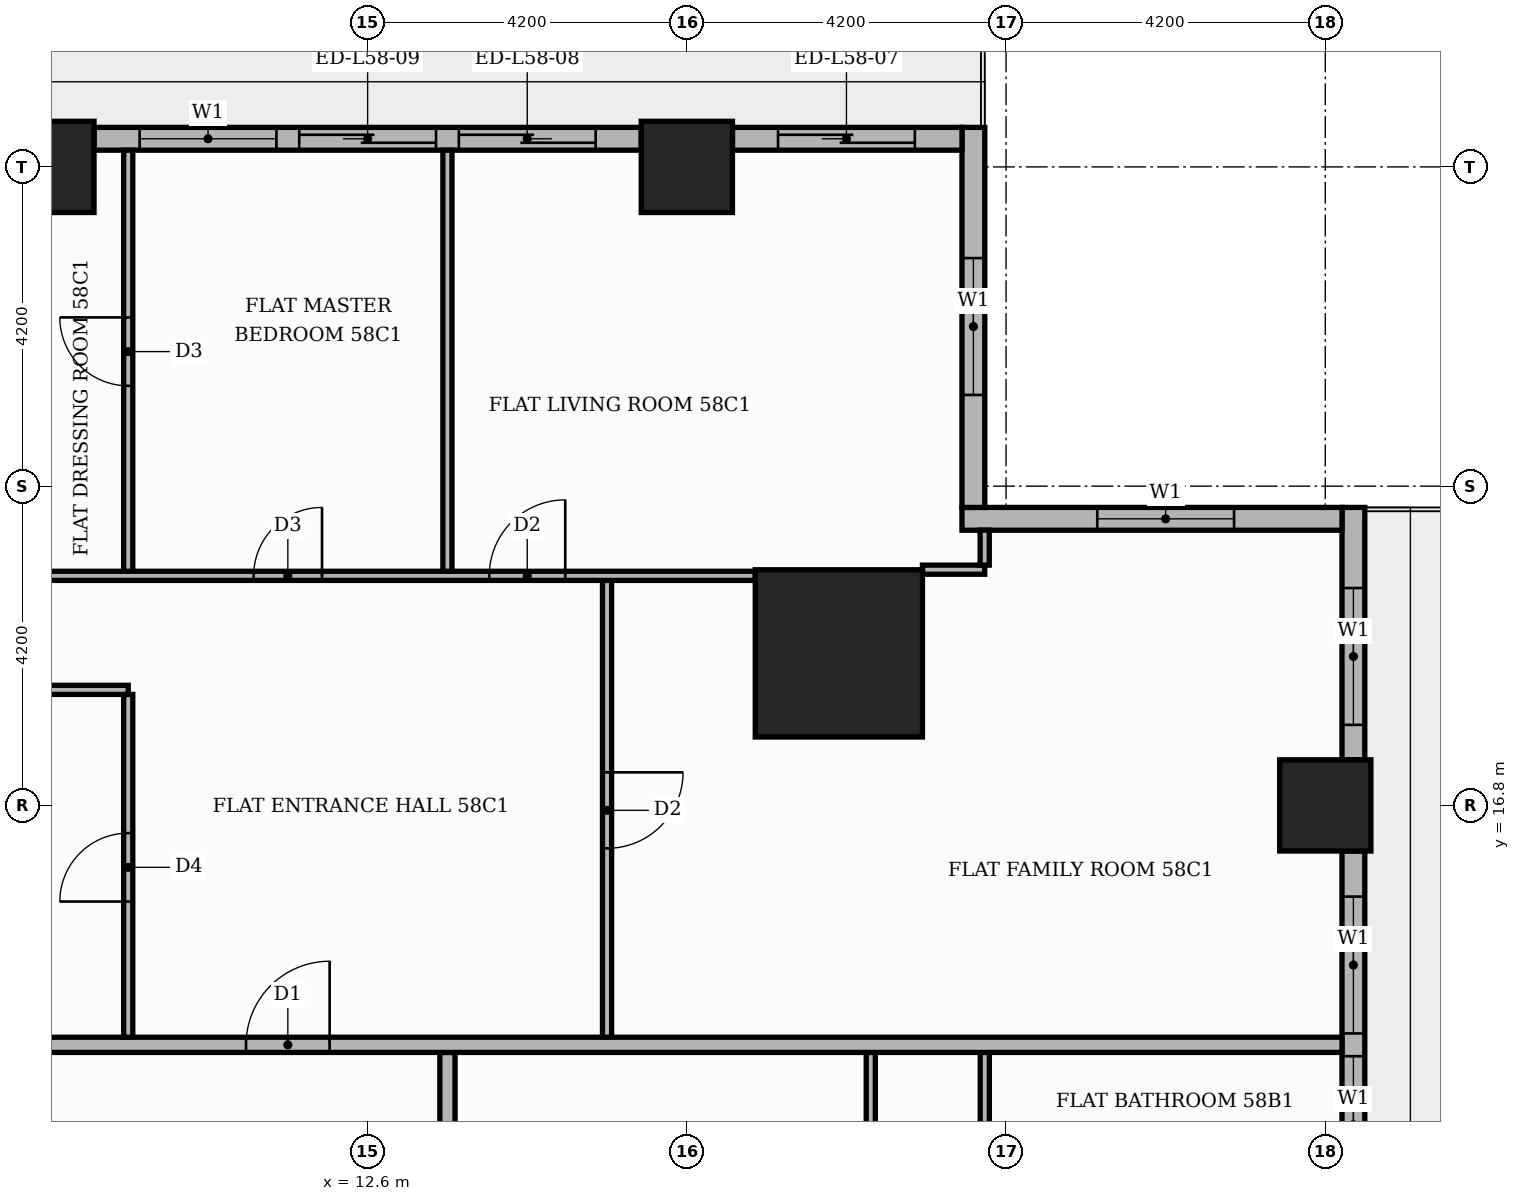
"""IFC4 building model, lengths in metres.
Left out: names, types, materials, properties, quantities, classifications, styles, units other than length and angle.
Written with IfcOpenShell. Run it as: python <this file> out.ifc"""

import sys

from ifc_helpers import new_model, si_unit, direction, frame, frame_2d, origin, origin_2d, place, context, subcontext, project, spatial, rectangle, extrude, element, fill, save


model = new_model("IFC4")
c1 = context("Model", 3, precision=1e-05, world=origin(), true_north=direction((0.0, 1.0)))
c2 = subcontext(c1, "Body", "Model", "MODEL_VIEW")
j1 = project(units=[si_unit("LENGTHUNIT", "METRE"), si_unit("PLANEANGLEUNIT", "RADIAN")], contexts=[c1])
p1 = place(None, origin())
s1 = spatial("IfcSite", under=j1, at=p1, CompositionType="ELEMENT")
p2 = place(p1, origin())
s2 = spatial("IfcBuilding", under=s1, at=p2, CompositionType="ELEMENT")
p3 = place(p2, frame((0.0, 0.0, 244.5)))
s3 = spatial("IfcBuildingStorey", under=s2, at=p3, CompositionType="ELEMENT", Elevation=244.5)
p4 = place(p3, frame((18.8, 18.8, 0.0), z_axis=(0.0, 0.0, 1.0), x_axis=(1.0, 0.0, 0.0)))
e1 = element("IfcColumn", 1, at=p4, inside=s3, PredefinedType="COLUMN", context=c2, shape_type="SweptSolid", body=[
    extrude(rectangle(XDim=2.2, YDim=2.2, at=origin_2d()), origin(), (0.0, 0.0, 1.0), 3.9),
])
for number, where, z_axis, x_axis in (
    (2, (25.2, 16.8, 0.0), (0.0, 0.0, 1.0), (1.0, 0.0, 0.0)),
    (3, (8.4, 25.2, 0.0), (0.0, 0.0, 1.0), (1.0, 0.0, 0.0)),
    (4, (16.8, 25.2, 0.0), (0.0, 0.0, 1.0), (1.0, 0.0, 0.0)),
):
    element("IfcColumn", number, at=place(p3, frame(where, z_axis=z_axis, x_axis=x_axis)), inside=s3, PredefinedType="COLUMN", context=c2, shape_type="SweptSolid", body=[
        extrude(rectangle(XDim=1.2, YDim=1.2, at=origin_2d()), origin(), (0.0, 0.0, 1.0), 3.9),
    ])
p5 = place(p3, frame((25.57, 9.0, 0.0), z_axis=(0.0, 0.0, 1.0), x_axis=(0.0, 1.0, 0.0)))
e5 = element("IfcWall", 5, at=p5, inside=s3, PredefinedType="STANDARD", context=c2, shape_type="SweptSolid", body=[
    extrude(rectangle(XDim=7.2, YDim=0.3, at=frame_2d((3.6, 0.0))), origin(), (0.0, 0.0, 1.0), 3.48),
])
p6 = place(p5, frame((0.6, 0.0, 0.9)))
e6 = element("IfcOpeningElement", 6, at=p6, cuts=e5, PredefinedType="OPENING", context=c2, shape_type="SweptSolid", body=[
    extrude(rectangle(XDim=1.8, YDim=2.1, at=frame_2d((0.9, 1.05))), frame((0.0, 0.16, 0.0), z_axis=(0.0, -1.0, 0.0), x_axis=(1.0, 0.0, 0.0)), (0.0, 0.0, 1.0), 0.32),
])
p7 = place(p5, frame((2.7, 0.0, 0.9)))
e7 = element("IfcOpeningElement", 7, at=p7, cuts=e5, PredefinedType="OPENING", context=c2, shape_type="SweptSolid", body=[
    extrude(rectangle(XDim=1.8, YDim=2.1, at=frame_2d((0.9, 1.05))), frame((0.0, 0.16, 0.0), z_axis=(0.0, -1.0, 0.0), x_axis=(1.0, 0.0, 0.0)), (0.0, 0.0, 1.0), 0.32),
])
p8 = place(p5, frame((4.8, 0.0, 0.9)))
e8 = element("IfcOpeningElement", 8, at=p8, cuts=e5, PredefinedType="OPENING", context=c2, shape_type="SweptSolid", body=[
    extrude(rectangle(XDim=1.8, YDim=2.1, at=frame_2d((0.9, 1.05))), frame((0.0, 0.16, 0.0), z_axis=(0.0, -1.0, 0.0), x_axis=(1.0, 0.0, 0.0)), (0.0, 0.0, 1.0), 0.32),
])
p9 = place(p3, frame((25.57, 17.4, 0.0), z_axis=(0.0, 0.0, 1.0), x_axis=(0.0, 1.0, 0.0)))
e9 = element("IfcWall", 9, at=p9, inside=s3, PredefinedType="STANDARD", context=c2, shape_type="SweptSolid", body=[
    extrude(rectangle(XDim=3.32, YDim=0.3, at=frame_2d((1.66, 0.0))), origin(), (0.0, 0.0, 1.0), 3.48),
])
p10 = place(p9, frame((0.459, 0.0, 0.9)))
e10 = element("IfcOpeningElement", 10, at=p10, cuts=e9, PredefinedType="OPENING", context=c2, shape_type="SweptSolid", body=[
    extrude(rectangle(XDim=1.8, YDim=2.1, at=frame_2d((0.9, 1.05))), frame((0.0, 0.16, 0.0), z_axis=(0.0, -1.0, 0.0), x_axis=(1.0, 0.0, 0.0)), (0.0, 0.0, 1.0), 0.32),
])
p11 = place(p3, frame((25.42, 20.57, 0.0), z_axis=(0.0, 0.0, 1.0), x_axis=(-1.0, 0.0, 0.0)))
e11 = element("IfcWall", 11, at=p11, inside=s3, PredefinedType="STANDARD", context=c2, shape_type="SweptSolid", body=[
    extrude(rectangle(XDim=5.0, YDim=0.3, at=frame_2d((2.5, 0.0))), origin(), (0.0, 0.0, 1.0), 3.48),
])
p12 = place(p11, frame((1.42, 0.0, 0.9)))
e12 = element("IfcOpeningElement", 12, at=p12, cuts=e11, PredefinedType="OPENING", context=c2, shape_type="SweptSolid", body=[
    extrude(rectangle(XDim=1.8, YDim=2.1, at=frame_2d((0.9, 1.05))), frame((0.0, 0.16, 0.0), z_axis=(0.0, -1.0, 0.0), x_axis=(1.0, 0.0, 0.0)), (0.0, 0.0, 1.0), 0.32),
])
p13 = place(p3, frame((20.57, 20.72, 0.0), z_axis=(0.0, 0.0, 1.0), x_axis=(0.0, 1.0, 0.0)))
e13 = element("IfcWall", 13, at=p13, inside=s3, PredefinedType="STANDARD", context=c2, shape_type="SweptSolid", body=[
    extrude(rectangle(XDim=5.0, YDim=0.3, at=frame_2d((2.5, 0.0))), origin(), (0.0, 0.0, 1.0), 3.48),
])
p14 = place(p13, frame((1.48, 0.0, 0.9)))
e14 = element("IfcOpeningElement", 14, at=p14, cuts=e13, PredefinedType="OPENING", context=c2, shape_type="SweptSolid", body=[
    extrude(rectangle(XDim=1.8, YDim=2.1, at=frame_2d((0.9, 1.05))), frame((0.0, 0.16, 0.0), z_axis=(0.0, -1.0, 0.0), x_axis=(1.0, 0.0, 0.0)), (0.0, 0.0, 1.0), 0.32),
])
p15 = place(p3, frame((20.42, 25.57, 0.0), z_axis=(0.0, 0.0, 1.0), x_axis=(-1.0, 0.0, 0.0)))
e15 = element("IfcWall", 15, at=p15, inside=s3, PredefinedType="STANDARD", context=c2, shape_type="SweptSolid", body=[
    extrude(rectangle(XDim=3.02, YDim=0.3, at=frame_2d((1.51, 0.0))), origin(), (0.0, 0.0, 1.0), 3.48),
])
p16 = place(p15, frame((0.62, 0.0, 0.0)))
e16 = element("IfcOpeningElement", 16, at=p16, cuts=e15, PredefinedType="OPENING", context=c2, shape_type="SweptSolid", body=[
    extrude(rectangle(XDim=1.8, YDim=2.4, at=frame_2d((0.9, 1.2))), frame((0.0, 0.16, 0.0), z_axis=(0.0, -1.0, 0.0), x_axis=(1.0, 0.0, 0.0)), (0.0, 0.0, 1.0), 0.32),
])
p17 = place(p3, frame((16.2, 25.57, 0.0), z_axis=(0.0, 0.0, 1.0), x_axis=(-1.0, 0.0, 0.0)))
e17 = element("IfcWall", 17, at=p17, inside=s3, PredefinedType="STANDARD", context=c2, shape_type="SweptSolid", body=[
    extrude(rectangle(XDim=7.2, YDim=0.3, at=frame_2d((3.6, 0.0))), origin(), (0.0, 0.0, 1.0), 3.48),
])
p18 = place(p17, frame((0.6, 0.0, 0.0)))
e18 = element("IfcOpeningElement", 18, at=p18, cuts=e17, PredefinedType="OPENING", context=c2, shape_type="SweptSolid", body=[
    extrude(rectangle(XDim=1.8, YDim=2.4, at=frame_2d((0.9, 1.2))), frame((0.0, 0.16, 0.0), z_axis=(0.0, -1.0, 0.0), x_axis=(1.0, 0.0, 0.0)), (0.0, 0.0, 1.0), 0.32),
])
p19 = place(p17, frame((2.7, 0.0, 0.0)))
e19 = element("IfcOpeningElement", 19, at=p19, cuts=e17, PredefinedType="OPENING", context=c2, shape_type="SweptSolid", body=[
    extrude(rectangle(XDim=1.8, YDim=2.4, at=frame_2d((0.9, 1.2))), frame((0.0, 0.16, 0.0), z_axis=(0.0, -1.0, 0.0), x_axis=(1.0, 0.0, 0.0)), (0.0, 0.0, 1.0), 0.32),
])
p20 = place(p17, frame((4.8, 0.0, 0.9)))
e20 = element("IfcOpeningElement", 20, at=p20, cuts=e17, PredefinedType="OPENING", context=c2, shape_type="SweptSolid", body=[
    extrude(rectangle(XDim=1.8, YDim=2.1, at=frame_2d((0.9, 1.05))), frame((0.0, 0.16, 0.0), z_axis=(0.0, -1.0, 0.0), x_axis=(1.0, 0.0, 0.0)), (0.0, 0.0, 1.0), 0.32),
])
p21 = place(p3, frame((19.22, 9.36, 0.0), z_axis=(0.0, 0.0, 1.0), x_axis=(0.0, 1.0, 0.0)))
e21 = element("IfcWall", 21, at=p21, inside=s3, PredefinedType="PARTITIONING", context=c2, shape_type="SweptSolid", body=[
    extrude(rectangle(XDim=4.19, YDim=0.12, at=frame_2d((2.095, 0.0))), origin(), (0.0, 0.0, 1.0), 3.48),
])
p22 = place(p21, frame((1.665, 0.0, 0.0)))
e22 = element("IfcOpeningElement", 22, at=p22, cuts=e21, PredefinedType="OPENING", context=c2, shape_type="SweptSolid", body=[
    extrude(rectangle(XDim=0.9, YDim=2.1, at=frame_2d((0.45, 1.05))), frame((0.0, 0.07, 0.0), z_axis=(0.0, -1.0, 0.0), x_axis=(1.0, 0.0, 0.0)), (0.0, 0.0, 1.0), 0.14),
])
p23 = place(p3, frame((13.65, 11.1, 0.0), z_axis=(0.0, 0.0, 1.0), x_axis=(0.0, 1.0, 0.0)))
e23 = element("IfcWall", 23, at=p23, inside=s3, PredefinedType="PARTITIONING", context=c2, shape_type="SweptSolid", body=[
    extrude(rectangle(XDim=2.45, YDim=0.2, at=frame_2d((1.225, 0.0))), origin(), (0.0, 0.0, 1.0), 3.48),
])
p24 = place(p3, frame((20.72, 11.61, 0.0), z_axis=(0.0, 0.0, 1.0), x_axis=(0.0, 1.0, 0.0)))
e24 = element("IfcWall", 24, at=p24, inside=s3, PredefinedType="PARTITIONING", context=c2, shape_type="SweptSolid", body=[
    extrude(rectangle(XDim=1.94, YDim=0.12, at=frame_2d((0.97, 0.0))), origin(), (0.0, 0.0, 1.0), 3.48),
])
p25 = place(p3, frame((-13.65, 13.65, 0.0), z_axis=(0.0, 0.0, 1.0), x_axis=(1.0, 0.0, 0.0)))
e25 = element("IfcWall", 25, at=p25, inside=s3, PredefinedType="PARTITIONING", context=c2, shape_type="SweptSolid", body=[
    extrude(rectangle(XDim=39.07, YDim=0.2, at=frame_2d((19.535, 0.0))), origin(), (0.0, 0.0, 1.0), 3.48),
])
p26 = place(p25, frame((24.65, 0.0, 0.0)))
e26 = element("IfcOpeningElement", 26, at=p26, cuts=e25, PredefinedType="OPENING", context=c2, shape_type="SweptSolid", body=[
    extrude(rectangle(XDim=1.1, YDim=2.4, at=frame_2d((0.55, 1.2))), frame((0.0, 0.11, 0.0), z_axis=(0.0, -1.0, 0.0), x_axis=(1.0, 0.0, 0.0)), (0.0, 0.0, 1.0), 0.22),
])
p27 = place(p25, frame((12.05, 0.0, 0.0)))
e27 = element("IfcOpeningElement", 27, at=p27, cuts=e25, PredefinedType="OPENING", context=c2, shape_type="SweptSolid", body=[
    extrude(rectangle(XDim=1.1, YDim=2.4, at=frame_2d((0.55, 1.2))), frame((0.0, 0.11, 0.0), z_axis=(0.0, -1.0, 0.0), x_axis=(1.0, 0.0, 0.0)), (0.0, 0.0, 1.0), 0.22),
])
p28 = place(p3, frame((9.45, 13.75, 0.0), z_axis=(0.0, 0.0, 1.0), x_axis=(0.0, 1.0, 0.0)))
e28 = element("IfcWall", 28, at=p28, inside=s3, PredefinedType="PARTITIONING", context=c2, shape_type="SweptSolid", body=[
    extrude(rectangle(XDim=4.51, YDim=0.12, at=frame_2d((2.255, 0.0))), origin(), (0.0, 0.0, 1.0), 3.48),
])
p29 = place(p28, frame((1.785, 0.0, 0.0)))
e29 = element("IfcOpeningElement", 29, at=p29, cuts=e28, PredefinedType="OPENING", context=c2, shape_type="SweptSolid", body=[
    extrude(rectangle(XDim=0.9, YDim=2.1, at=frame_2d((0.45, 1.05))), frame((0.0, 0.07, 0.0), z_axis=(0.0, -1.0, 0.0), x_axis=(1.0, 0.0, 0.0)), (0.0, 0.0, 1.0), 0.14),
])
p30 = place(p3, frame((15.75, 13.75, 0.0), z_axis=(0.0, 0.0, 1.0), x_axis=(0.0, 1.0, 0.0)))
e30 = element("IfcWall", 30, at=p30, inside=s3, PredefinedType="PARTITIONING", context=c2, shape_type="SweptSolid", body=[
    extrude(rectangle(XDim=6.01, YDim=0.12, at=frame_2d((3.005, 0.0))), origin(), (0.0, 0.0, 1.0), 3.48),
])
p31 = place(p30, frame((2.485, 0.0, 0.0)))
e31 = element("IfcOpeningElement", 31, at=p31, cuts=e30, PredefinedType="OPENING", context=c2, shape_type="SweptSolid", body=[
    extrude(rectangle(XDim=1.0, YDim=2.1, at=frame_2d((0.5, 1.05))), frame((0.0, 0.07, 0.0), z_axis=(0.0, -1.0, 0.0), x_axis=(1.0, 0.0, 0.0)), (0.0, 0.0, 1.0), 0.14),
])
p32 = place(p3, frame((5.35, 18.32, 0.0), z_axis=(0.0, 0.0, 1.0), x_axis=(1.0, 0.0, 0.0)))
e32 = element("IfcWall", 32, at=p32, inside=s3, PredefinedType="PARTITIONING", context=c2, shape_type="SweptSolid", body=[
    extrude(rectangle(XDim=4.1, YDim=0.12, at=frame_2d((2.05, 0.0))), origin(), (0.0, 0.0, 1.0), 3.48),
])
p33 = place(p32, frame((0.5, 0.0, 0.0)))
e33 = element("IfcOpeningElement", 33, at=p33, cuts=e32, PredefinedType="OPENING", context=c2, shape_type="SweptSolid", body=[
    extrude(rectangle(XDim=0.9, YDim=2.1, at=frame_2d((0.45, 1.05))), frame((0.0, 0.07, 0.0), z_axis=(0.0, -1.0, 0.0), x_axis=(1.0, 0.0, 0.0)), (0.0, 0.0, 1.0), 0.14),
])
p34 = place(p3, frame((5.35, 19.82, 0.0), z_axis=(0.0, 0.0, 1.0), x_axis=(1.0, 0.0, 0.0)))
e34 = element("IfcWall", 34, at=p34, inside=s3, PredefinedType="PARTITIONING", context=c2, shape_type="SweptSolid", body=[
    extrude(rectangle(XDim=12.35, YDim=0.12, at=frame_2d((6.175, 0.0))), origin(), (0.0, 0.0, 1.0), 3.48),
])
p35 = place(p34, frame((8.85, 0.0, 0.0)))
e35 = element("IfcOpeningElement", 35, at=p35, cuts=e34, PredefinedType="OPENING", context=c2, shape_type="SweptSolid", body=[
    extrude(rectangle(XDim=1.0, YDim=2.1, at=frame_2d((0.5, 1.05))), frame((0.0, 0.07, 0.0), z_axis=(0.0, -1.0, 0.0), x_axis=(1.0, 0.0, 0.0)), (0.0, 0.0, 1.0), 0.14),
])
p36 = place(p34, frame((5.75, 0.0, 0.0)))
e36 = element("IfcOpeningElement", 36, at=p36, cuts=e34, PredefinedType="OPENING", context=c2, shape_type="SweptSolid", body=[
    extrude(rectangle(XDim=0.9, YDim=2.1, at=frame_2d((0.45, 1.05))), frame((0.0, 0.07, 0.0), z_axis=(0.0, -1.0, 0.0), x_axis=(1.0, 0.0, 0.0)), (0.0, 0.0, 1.0), 0.14),
])
p37 = place(p3, frame((9.45, 19.88, 0.0), z_axis=(0.0, 0.0, 1.0), x_axis=(0.0, 1.0, 0.0)))
e37 = element("IfcWall", 37, at=p37, inside=s3, PredefinedType="PARTITIONING", context=c2, shape_type="SweptSolid", body=[
    extrude(rectangle(XDim=5.54, YDim=0.12, at=frame_2d((2.77, 0.0))), origin(), (0.0, 0.0, 1.0), 3.48),
])
p38 = place(p37, frame((2.44, 0.0, 0.0)))
e38 = element("IfcOpeningElement", 38, at=p38, cuts=e37, PredefinedType="OPENING", context=c2, shape_type="SweptSolid", body=[
    extrude(rectangle(XDim=0.9, YDim=2.1, at=frame_2d((0.45, 1.05))), frame((0.0, 0.07, 0.0), z_axis=(0.0, -1.0, 0.0), x_axis=(1.0, 0.0, 0.0)), (0.0, 0.0, 1.0), 0.14),
])
p39 = place(p3, frame((13.65, 19.88, 0.0), z_axis=(0.0, 0.0, 1.0), x_axis=(0.0, 1.0, 0.0)))
e39 = element("IfcWall", 39, at=p39, inside=s3, PredefinedType="PARTITIONING", context=c2, shape_type="SweptSolid", body=[
    extrude(rectangle(XDim=5.54, YDim=0.12, at=frame_2d((2.77, 0.0))), origin(), (0.0, 0.0, 1.0), 3.48),
])
p40 = place(p3, frame((19.9, 19.901, 0.0), z_axis=(0.0, 0.0, 1.0), x_axis=(1.0, 0.0, 0.0)))
e40 = element("IfcWall", 40, at=p40, inside=s3, PredefinedType="PARTITIONING", context=c2, shape_type="SweptSolid", body=[
    extrude(rectangle(XDim=0.819, YDim=0.12, at=frame_2d((0.41, 0.0))), origin(), (0.0, 0.0, 1.0), 3.48),
])
p41 = place(p3, frame((20.719, 19.961, 0.0), z_axis=(0.0, 0.0, 1.0), x_axis=(0.0, 1.0, 0.0)))
e41 = element("IfcWall", 41, at=p41, inside=s3, PredefinedType="PARTITIONING", context=c2, shape_type="SweptSolid", body=[
    extrude(rectangle(XDim=0.46, YDim=0.12, at=frame_2d((0.23, 0.0))), origin(), (0.0, 0.0, 1.0), 3.48),
])
p42 = place(p7, origin())
e42 = element("IfcWindow", 42, at=p42, inside=s3, PartitioningType="SINGLE_PANEL", PredefinedType="WINDOW", context=c2, shape_type="SweptSolid", body=[
    extrude(rectangle(XDim=1.8, YDim=2.1, at=frame_2d((0.9, 1.05))), frame((0.0, 0.03, 0.0), z_axis=(0.0, -1.0, 0.0), x_axis=(1.0, 0.0, 0.0)), (0.0, 0.0, 1.0), 0.06),
])
fill(e7, e42)
p43 = place(p8, origin())
e43 = element("IfcWindow", 43, at=p43, inside=s3, PartitioningType="SINGLE_PANEL", PredefinedType="WINDOW", context=c2, shape_type="SweptSolid", body=[
    extrude(rectangle(XDim=1.8, YDim=2.1, at=frame_2d((0.9, 1.05))), frame((0.0, 0.03, 0.0), z_axis=(0.0, -1.0, 0.0), x_axis=(1.0, 0.0, 0.0)), (0.0, 0.0, 1.0), 0.06),
])
fill(e8, e43)
p44 = place(p10, origin())
e44 = element("IfcWindow", 44, at=p44, inside=s3, PartitioningType="SINGLE_PANEL", PredefinedType="WINDOW", context=c2, shape_type="SweptSolid", body=[
    extrude(rectangle(XDim=1.8, YDim=2.1, at=frame_2d((0.9, 1.05))), frame((0.0, 0.03, 0.0), z_axis=(0.0, -1.0, 0.0), x_axis=(1.0, 0.0, 0.0)), (0.0, 0.0, 1.0), 0.06),
])
fill(e10, e44)
p45 = place(p12, origin())
e45 = element("IfcWindow", 45, at=p45, inside=s3, PartitioningType="SINGLE_PANEL", PredefinedType="WINDOW", context=c2, shape_type="SweptSolid", body=[
    extrude(rectangle(XDim=1.8, YDim=2.1, at=frame_2d((0.9, 1.05))), frame((0.0, 0.03, 0.0), z_axis=(0.0, -1.0, 0.0), x_axis=(1.0, 0.0, 0.0)), (0.0, 0.0, 1.0), 0.06),
])
fill(e12, e45)
p46 = place(p14, origin())
e46 = element("IfcWindow", 46, at=p46, inside=s3, PartitioningType="SINGLE_PANEL", PredefinedType="WINDOW", context=c2, shape_type="SweptSolid", body=[
    extrude(rectangle(XDim=1.8, YDim=2.1, at=frame_2d((0.9, 1.05))), frame((0.0, 0.03, 0.0), z_axis=(0.0, -1.0, 0.0), x_axis=(1.0, 0.0, 0.0)), (0.0, 0.0, 1.0), 0.06),
])
fill(e14, e46)
p47 = place(p16, origin())
e47 = element("IfcDoor", 47, at=p47, inside=s3, OperationType="SLIDING_TO_RIGHT", PredefinedType="DOOR", context=c2, shape_type="SweptSolid", body=[
    extrude(rectangle(XDim=1.8, YDim=2.4, at=frame_2d((0.9, 1.2))), frame((0.0, 0.025, 0.0), z_axis=(0.0, -1.0, 0.0), x_axis=(1.0, 0.0, 0.0)), (0.0, 0.0, 1.0), 0.05),
])
fill(e16, e47)
p48 = place(p18, origin())
e48 = element("IfcDoor", 48, at=p48, inside=s3, OperationType="SLIDING_TO_LEFT", PredefinedType="DOOR", context=c2, shape_type="SweptSolid", body=[
    extrude(rectangle(XDim=1.8, YDim=2.4, at=frame_2d((0.9, 1.2))), frame((0.0, 0.025, 0.0), z_axis=(0.0, -1.0, 0.0), x_axis=(1.0, 0.0, 0.0)), (0.0, 0.0, 1.0), 0.05),
])
fill(e18, e48)
p49 = place(p19, origin())
e49 = element("IfcDoor", 49, at=p49, inside=s3, OperationType="SLIDING_TO_RIGHT", PredefinedType="DOOR", context=c2, shape_type="SweptSolid", body=[
    extrude(rectangle(XDim=1.8, YDim=2.4, at=frame_2d((0.9, 1.2))), frame((0.0, 0.025, 0.0), z_axis=(0.0, -1.0, 0.0), x_axis=(1.0, 0.0, 0.0)), (0.0, 0.0, 1.0), 0.05),
])
fill(e19, e49)
p50 = place(p20, origin())
e50 = element("IfcWindow", 50, at=p50, inside=s3, PartitioningType="SINGLE_PANEL", PredefinedType="WINDOW", context=c2, shape_type="SweptSolid", body=[
    extrude(rectangle(XDim=1.8, YDim=2.1, at=frame_2d((0.9, 1.05))), frame((0.0, 0.03, 0.0), z_axis=(0.0, -1.0, 0.0), x_axis=(1.0, 0.0, 0.0)), (0.0, 0.0, 1.0), 0.06),
])
fill(e20, e50)
p51 = place(p26, origin())
e51 = element("IfcDoor", 51, at=p51, inside=s3, OperationType="SINGLE_SWING_RIGHT", PredefinedType="DOOR", context=c2, shape_type="SweptSolid", body=[
    extrude(rectangle(XDim=1.1, YDim=2.4, at=frame_2d((0.55, 1.2))), frame((0.0, 0.025, 0.0), z_axis=(0.0, -1.0, 0.0), x_axis=(1.0, 0.0, 0.0)), (0.0, 0.0, 1.0), 0.05),
])
fill(e26, e51)
p52 = place(p31, frame((1.0, 0.0, 0.0), z_axis=(0.0, 0.0, 1.0), x_axis=(-1.0, 0.0, 0.0)))
e52 = element("IfcDoor", 52, at=p52, inside=s3, OperationType="SINGLE_SWING_RIGHT", PredefinedType="DOOR", context=c2, shape_type="SweptSolid", body=[
    extrude(rectangle(XDim=1.0, YDim=2.1, at=frame_2d((0.5, 1.05))), frame((0.0, 0.025, 0.0), z_axis=(0.0, -1.0, 0.0), x_axis=(1.0, 0.0, 0.0)), (0.0, 0.0, 1.0), 0.05),
])
fill(e31, e52)
p53 = place(p29, origin())
e53 = element("IfcDoor", 53, at=p53, inside=s3, OperationType="SINGLE_SWING_LEFT", PredefinedType="DOOR", context=c2, shape_type="SweptSolid", body=[
    extrude(rectangle(XDim=0.9, YDim=2.1, at=frame_2d((0.45, 1.05))), frame((0.0, 0.025, 0.0), z_axis=(0.0, -1.0, 0.0), x_axis=(1.0, 0.0, 0.0)), (0.0, 0.0, 1.0), 0.05),
])
fill(e29, e53)
p54 = place(p35, origin())
e54 = element("IfcDoor", 54, at=p54, inside=s3, OperationType="SINGLE_SWING_RIGHT", PredefinedType="DOOR", context=c2, shape_type="SweptSolid", body=[
    extrude(rectangle(XDim=1.0, YDim=2.1, at=frame_2d((0.5, 1.05))), frame((0.0, 0.025, 0.0), z_axis=(0.0, -1.0, 0.0), x_axis=(1.0, 0.0, 0.0)), (0.0, 0.0, 1.0), 0.05),
])
fill(e35, e54)
p55 = place(p36, origin())
e55 = element("IfcDoor", 55, at=p55, inside=s3, OperationType="SINGLE_SWING_RIGHT", PredefinedType="DOOR", context=c2, shape_type="SweptSolid", body=[
    extrude(rectangle(XDim=0.9, YDim=2.1, at=frame_2d((0.45, 1.05))), frame((0.0, 0.025, 0.0), z_axis=(0.0, -1.0, 0.0), x_axis=(1.0, 0.0, 0.0)), (0.0, 0.0, 1.0), 0.05),
])
fill(e36, e55)
p56 = place(p38, origin())
e56 = element("IfcDoor", 56, at=p56, inside=s3, OperationType="SINGLE_SWING_RIGHT", PredefinedType="DOOR", context=c2, shape_type="SweptSolid", body=[
    extrude(rectangle(XDim=0.9, YDim=2.1, at=frame_2d((0.45, 1.05))), frame((0.0, 0.025, 0.0), z_axis=(0.0, -1.0, 0.0), x_axis=(1.0, 0.0, 0.0)), (0.0, 0.0, 1.0), 0.05),
])
fill(e38, e56)
save(model, sys.argv[1])
